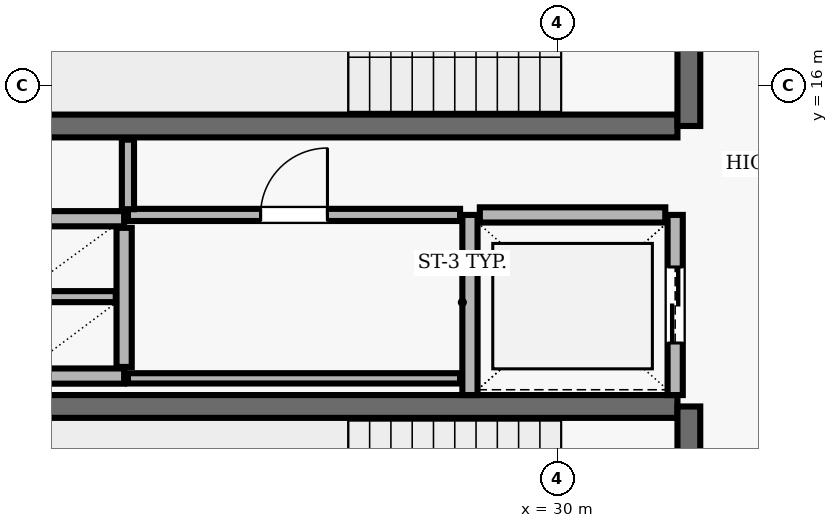
"""IFC4 building model, lengths in metres.
Left out: names, types, materials, properties, quantities, classifications, styles, units other than length and angle.
Written with IfcOpenShell. Run it as: python <this file> out.ifc"""

import sys

from ifc_helpers import new_model, si_unit, direction, frame, frame_2d, origin, place, context, subcontext, project, spatial, rectangle, extrude, element, fill, save


model = new_model("IFC4")
c1 = context("Model", 3, precision=1e-05, world=origin(), true_north=direction((0.0, 1.0)))
c2 = subcontext(c1, "Body", "Model", "MODEL_VIEW")
j1 = project(units=[si_unit("LENGTHUNIT", "METRE"), si_unit("PLANEANGLEUNIT", "RADIAN")], contexts=[c1])
p1 = place(None, origin())
s1 = spatial("IfcSite", under=j1, at=p1, CompositionType="ELEMENT")
p2 = place(p1, origin())
s2 = spatial("IfcBuilding", under=s1, at=p2, CompositionType="ELEMENT")
p3 = place(p2, frame((0.0, 0.0, 263.8)))
s3 = spatial("IfcBuildingStorey", under=s2, at=p3, CompositionType="ELEMENT", Elevation=263.8)
p4 = place(p3, frame((23.22, 15.47, 0.0), z_axis=(0.0, 0.0, 1.0), x_axis=(1.0, 0.0, 0.0)))
e1 = element("IfcWall", 1, at=p4, inside=s3, PredefinedType="SHEAR", context=c2, shape_type="SweptSolid", body=[
    extrude(rectangle(XDim=8.36, YDim=0.3, at=frame_2d((4.18, 0.0))), origin(), (0.0, 0.0, 1.0), 3.69),
])
p5 = place(p3, frame((31.73, 15.47, 0.0), z_axis=(0.0, 0.0, 1.0), x_axis=(0.0, 1.0, 0.0)))
e2 = element("IfcWall", 2, at=p5, inside=s3, PredefinedType="SHEAR", context=c2, shape_type="SweptSolid", body=[
    extrude(rectangle(XDim=3.51, YDim=0.3, at=frame_2d((1.755, 0.0))), origin(), (0.0, 0.0, 1.0), 3.69),
])
p6 = place(p5, frame((1.18, 0.0, 0.0)))
e3 = element("IfcOpeningElement", 3, at=p6, cuts=e2, PredefinedType="OPENING", context=c2, shape_type="SweptSolid", body=[
    extrude(rectangle(XDim=1.15, YDim=2.15, at=frame_2d((0.575, 1.075))), frame((0.0, 0.16, 0.0), z_axis=(0.0, -1.0, 0.0), x_axis=(1.0, 0.0, 0.0)), (0.0, 0.0, 1.0), 0.32),
])
p7 = place(p3, frame((31.58, 11.78, 0.0), z_axis=(0.0, 0.0, 1.0), x_axis=(-1.0, 0.0, 0.0)))
e4 = element("IfcWall", 4, at=p7, inside=s3, PredefinedType="SHEAR", context=c2, shape_type="SweptSolid", body=[
    extrude(rectangle(XDim=8.36, YDim=0.3, at=frame_2d((4.18, 0.0))), origin(), (0.0, 0.0, 1.0), 3.69),
])
p8 = place(p3, frame((31.73, 8.27, 0.0), z_axis=(0.0, 0.0, 1.0), x_axis=(0.0, 1.0, 0.0)))
e5 = element("IfcWall", 5, at=p8, inside=s3, PredefinedType="SHEAR", context=c2, shape_type="SweptSolid", body=[
    extrude(rectangle(XDim=3.51, YDim=0.3, at=frame_2d((1.755, 0.0))), origin(), (0.0, 0.0, 1.0), 3.69),
])
p9 = place(p8, frame((1.18, 0.0, 0.0)))
e6 = element("IfcOpeningElement", 6, at=p9, cuts=e5, PredefinedType="OPENING", context=c2, shape_type="SweptSolid", body=[
    extrude(rectangle(XDim=1.15, YDim=2.15, at=frame_2d((0.575, 1.075))), frame((0.0, 0.16, 0.0), z_axis=(0.0, -1.0, 0.0), x_axis=(1.0, 0.0, 0.0)), (0.0, 0.0, 1.0), 0.32),
])
p10 = place(p3, frame((28.85, 14.3, 0.0), z_axis=(0.0, 0.0, 1.0), x_axis=(0.0, -1.0, 0.0)))
e7 = element("IfcWall", 7, at=p10, inside=s3, PredefinedType="SOLIDWALL", context=c2, shape_type="SweptSolid", body=[
    extrude(rectangle(XDim=2.37, YDim=0.2, at=frame_2d((1.185, 0.0))), origin(), (0.0, 0.0, 1.0), 3.69),
])
p11 = place(p3, frame((31.55, 11.93, 0.0), z_axis=(0.0, 0.0, 1.0), x_axis=(0.0, 1.0, 0.0)))
e8 = element("IfcWall", 8, at=p11, inside=s3, PredefinedType="SOLIDWALL", context=c2, shape_type="SweptSolid", body=[
    extrude(rectangle(XDim=2.37, YDim=0.2, at=frame_2d((1.185, 0.0))), origin(), (0.0, 0.0, 1.0), 3.69),
])
p12 = place(p11, frame((0.685, 0.0, 0.0)))
e9 = element("IfcOpeningElement", 9, at=p12, cuts=e8, PredefinedType="OPENING", context=c2, shape_type="SweptSolid", body=[
    extrude(rectangle(XDim=1.0, YDim=2.1, at=frame_2d((0.5, 1.05))), frame((0.0, 0.11, 0.0), z_axis=(0.0, -1.0, 0.0), x_axis=(1.0, 0.0, 0.0)), (0.0, 0.0, 1.0), 0.22),
])
p13 = place(p3, frame((31.42, 14.3, 0.0), z_axis=(0.0, 0.0, 1.0), x_axis=(-1.0, 0.0, 0.0)))
e10 = element("IfcWall", 10, at=p13, inside=s3, PredefinedType="SOLIDWALL", context=c2, shape_type="SweptSolid", body=[
    extrude(rectangle(XDim=2.44, YDim=0.2, at=frame_2d((1.22, 0.0))), origin(), (0.0, 0.0, 1.0), 3.69),
])
for number, where, z_axis, x_axis in (
    (11, (22.9, 14.25, 0.0), (0.0, 0.0, 1.0), (1.0, 0.0, 0.0)),
    (12, (22.9, 12.18, 0.0), (0.0, 0.0, 1.0), (1.0, 0.0, 0.0)),
):
    element("IfcWall", number, at=place(p3, frame(where, z_axis=z_axis, x_axis=x_axis)), inside=s3, PredefinedType="SOLIDWALL", context=c2, shape_type="SweptSolid", body=[
        extrude(rectangle(XDim=1.4, YDim=0.2, at=frame_2d((0.7, 0.0))), origin(), (0.0, 0.0, 1.0), 3.69),
    ])
p14 = place(p3, frame((24.3, 12.3, 0.0), z_axis=(0.0, 0.0, 1.0), x_axis=(0.0, 1.0, 0.0)))
e13 = element("IfcWall", 13, at=p14, inside=s3, PredefinedType="SOLIDWALL", context=c2, shape_type="SweptSolid", body=[
    extrude(rectangle(XDim=1.83, YDim=0.2, at=frame_2d((0.915, 0.0))), origin(), (0.0, 0.0, 1.0), 3.69),
])
p15 = place(p3, frame((23.01, 13.225, 0.0), z_axis=(0.0, 0.0, 1.0), x_axis=(1.0, 0.0, 0.0)))
e14 = element("IfcWall", 14, at=p15, inside=s3, PredefinedType="PARTITIONING", context=c2, shape_type="SweptSolid", body=[
    extrude(rectangle(XDim=1.18, YDim=0.145, at=frame_2d((0.59, 0.0))), origin(), (0.0, 0.0, 1.0), 3.69),
])
p16 = place(p3, frame((24.35, 12.15, 0.0), z_axis=(0.0, 0.0, 1.0), x_axis=(1.0, 0.0, 0.0)))
e15 = element("IfcWall", 15, at=p16, inside=s3, PredefinedType="PARTITIONING", context=c2, shape_type="SweptSolid", body=[
    extrude(rectangle(XDim=4.37, YDim=0.135, at=frame_2d((2.185, 0.0))), origin(), (0.0, 0.0, 1.0), 3.69),
])
p17 = place(p3, frame((24.35, 14.3, 0.0), z_axis=(0.0, 0.0, 1.0), x_axis=(1.0, 0.0, 0.0)))
e16 = element("IfcWall", 16, at=p17, inside=s3, PredefinedType="PARTITIONING", context=c2, shape_type="SweptSolid", body=[
    extrude(rectangle(XDim=4.37, YDim=0.16, at=frame_2d((2.185, 0.0))), origin(), (0.0, 0.0, 1.0), 3.69),
])
p18 = place(p17, frame((1.745, 0.0, 0.0)))
e17 = element("IfcOpeningElement", 17, at=p18, cuts=e16, PredefinedType="OPENING", context=c2, shape_type="SweptSolid", body=[
    extrude(rectangle(XDim=0.88, YDim=2.1, at=frame_2d((0.44, 1.05))), frame((0.0, 0.09, 0.0), z_axis=(0.0, -1.0, 0.0), x_axis=(1.0, 0.0, 0.0)), (0.0, 0.0, 1.0), 0.18),
])
p19 = place(p3, frame((24.35, 15.29, 0.0), z_axis=(0.0, 0.0, 1.0), x_axis=(0.0, -1.0, 0.0)))
e18 = element("IfcWall", 18, at=p19, inside=s3, PredefinedType="PARTITIONING", context=c2, shape_type="SweptSolid", body=[
    extrude(rectangle(XDim=0.915, YDim=0.16, at=frame_2d((0.458, 0.0))), origin(), (0.0, 0.0, 1.0), 3.69),
])
p20 = place(p12, origin())
e19 = element("IfcDoor", 19, at=p20, inside=s3, OperationType="DOUBLE_DOOR_SLIDING", PredefinedType="DOOR", context=c2, shape_type="SweptSolid", body=[
    extrude(rectangle(XDim=1.0, YDim=2.1, at=frame_2d((0.5, 1.05))), frame((0.0, 0.025, 0.0), z_axis=(0.0, -1.0, 0.0), x_axis=(1.0, 0.0, 0.0)), (0.0, 0.0, 1.0), 0.05),
])
fill(e9, e19)
p21 = place(p18, origin())
e20 = element("IfcDoor", 20, at=p21, inside=s3, OperationType="SINGLE_SWING_RIGHT", PredefinedType="DOOR", context=c2, shape_type="SweptSolid", body=[
    extrude(rectangle(XDim=0.88, YDim=2.1, at=frame_2d((0.44, 1.05))), frame((0.0, 0.025, 0.0), z_axis=(0.0, -1.0, 0.0), x_axis=(1.0, 0.0, 0.0)), (0.0, 0.0, 1.0), 0.05),
])
fill(e17, e20)
save(model, sys.argv[1])
